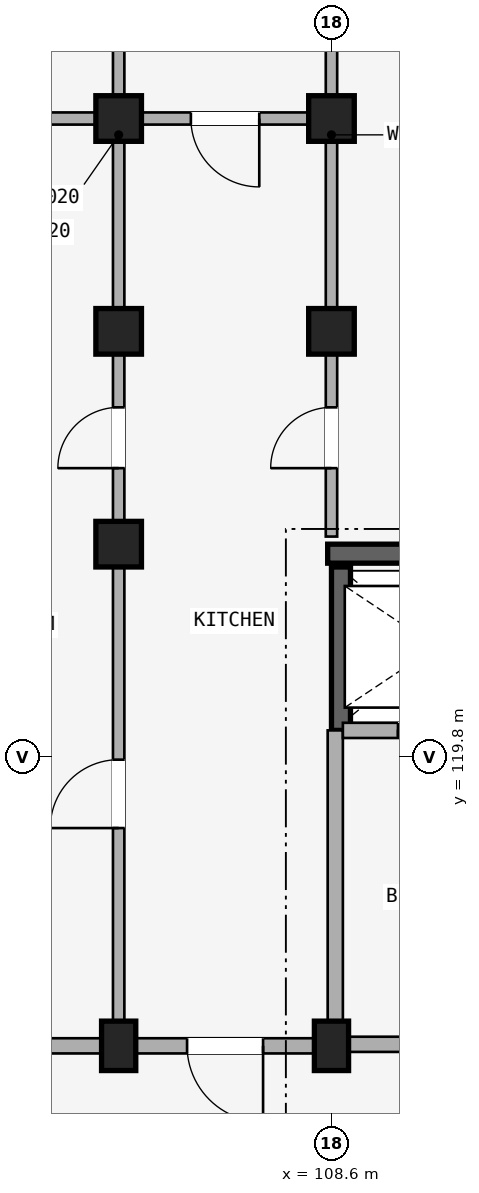
"""IFC4 building model, lengths in metres.
Left out: names, types, materials, properties, quantities, classifications, styles, units other than length and angle.
Written with IfcOpenShell. Run it as: python <this file> out.ifc"""

import sys

from ifc_helpers import new_model, si_unit, direction, frame, frame_2d, origin, origin_2d, place, context, subcontext, project, spatial, rectangle, extrude, element, fill, save


model = new_model("IFC4")
c1 = context("Model", 3, precision=1e-05, world=origin(), true_north=direction((0.0, 1.0)))
c2 = subcontext(c1, "Body", "Model", "MODEL_VIEW")
j1 = project(units=[si_unit("LENGTHUNIT", "METRE"), si_unit("PLANEANGLEUNIT", "RADIAN")], contexts=[c1])
p1 = place(None, origin())
s1 = spatial("IfcSite", under=j1, at=p1, CompositionType="ELEMENT")
p2 = place(p1, origin())
s2 = spatial("IfcBuilding", under=s1, at=p2, CompositionType="ELEMENT")
p3 = place(p2, frame((0.0, 0.0, 30.75)))
s3 = spatial("IfcBuildingStorey", under=s2, at=p3, CompositionType="ELEMENT", Elevation=30.75)
p4 = place(p3, frame((111.35, 122.475, 0.0), z_axis=(0.0, 0.0, 1.0), x_axis=(-1.0, 0.0, 0.0)))
e1 = element("IfcWall", 1, at=p4, inside=s3, PredefinedType="SHEAR", context=c2, shape_type="SweptSolid", body=[
    extrude(rectangle(XDim=2.8, YDim=0.25, at=frame_2d((1.4, 0.0))), origin(), (0.0, 0.0, 1.0), 2.93),
])
p5 = place(p3, frame((108.725, 120.15, 0.0), z_axis=(0.0, 0.0, 1.0), x_axis=(0.0, 1.0, 0.0)))
e2 = element("IfcWall", 2, at=p5, inside=s3, PredefinedType="SHEAR", context=c2, shape_type="SweptSolid", body=[
    extrude(rectangle(XDim=2.15, YDim=0.25, at=frame_2d((1.075, 0.0))), origin(), (0.0, 0.0, 1.0), 2.93),
])
p6 = place(p3, frame((108.6, 116.0, 0.0), z_axis=(0.0, 0.0, 1.0), x_axis=(1.0, 0.0, 0.0)))
e3 = element("IfcColumn", 3, at=p6, inside=s3, PredefinedType="COLUMN", context=c2, shape_type="SweptSolid", body=[
    extrude(rectangle(XDim=0.45, YDim=0.65, at=origin_2d()), origin(), (0.0, 0.0, 1.0), 2.93),
])
for number, where, z_axis, x_axis in (
    (4, (108.6, 125.4, 0.0), (0.0, 0.0, 1.0), (1.0, 0.0, 0.0)),
    (5, (108.6, 128.2, 0.0), (0.0, 0.0, 1.0), (1.0, 0.0, 0.0)),
):
    element("IfcColumn", number, at=place(p3, frame(where, z_axis=z_axis, x_axis=x_axis)), inside=s3, PredefinedType="COLUMN", context=c2, shape_type="SweptSolid", body=[
        extrude(rectangle(XDim=0.6, YDim=0.6, at=origin_2d()), origin(), (0.0, 0.0, 1.0), 2.93),
    ])
p7 = place(p3, frame((105.8, 116.0, 0.0), z_axis=(0.0, 0.0, 1.0), x_axis=(1.0, 0.0, 0.0)))
e6 = element("IfcColumn", 6, at=p7, inside=s3, PredefinedType="COLUMN", context=c2, shape_type="SweptSolid", body=[
    extrude(rectangle(XDim=0.45, YDim=0.65, at=origin_2d()), origin(), (0.0, 0.0, 1.0), 2.93),
])
for number, where, z_axis, x_axis in (
    (7, (105.8, 122.6, 0.0), (0.0, 0.0, 1.0), (1.0, 0.0, 0.0)),
    (8, (105.8, 125.4, 0.0), (0.0, 0.0, 1.0), (1.0, 0.0, 0.0)),
    (9, (105.8, 128.2, 0.0), (0.0, 0.0, 1.0), (1.0, 0.0, 0.0)),
):
    element("IfcColumn", number, at=place(p3, frame(where, z_axis=z_axis, x_axis=x_axis)), inside=s3, PredefinedType="COLUMN", context=c2, shape_type="SweptSolid", body=[
        extrude(rectangle(XDim=0.6, YDim=0.6, at=origin_2d()), origin(), (0.0, 0.0, 1.0), 2.93),
    ])
p8 = place(p3, frame((114.3, 116.02, 0.0), z_axis=(0.0, 0.0, 1.0), x_axis=(-1.0, 0.0, 0.0)))
e10 = element("IfcWall", 10, at=p8, inside=s3, PredefinedType="STANDARD", context=c2, shape_type="SweptSolid", body=[
    extrude(rectangle(XDim=5.65, YDim=0.2, at=frame_2d((2.825, 0.0))), origin(), (0.0, 0.0, 1.0), 2.372),
])
p9 = place(p8, frame((1.923, 0.0, 0.0)))
e11 = element("IfcOpeningElement", 11, at=p9, cuts=e10, PredefinedType="OPENING", context=c2, shape_type="SweptSolid", body=[
    extrude(rectangle(XDim=1.24, YDim=2.15, at=frame_2d((0.62, 1.075))), frame((0.0, 0.11, 0.0), z_axis=(0.0, -1.0, 0.0), x_axis=(1.0, 0.0, 0.0)), (0.0, 0.0, 1.0), 0.22),
])
p10 = place(p3, frame((108.65, 116.02, 0.0), z_axis=(0.0, 0.0, 1.0), x_axis=(0.0, 1.0, 0.0)))
e12 = element("IfcWall", 12, at=p10, inside=s3, PredefinedType="STANDARD", context=c2, shape_type="SweptSolid", body=[
    extrude(rectangle(XDim=4.13, YDim=0.2, at=frame_2d((2.065, 0.0))), origin(), (0.0, 0.0, 1.0), 2.372),
])
p11 = place(p3, frame((111.3, 120.15, 0.0), z_axis=(0.0, 0.0, 1.0), x_axis=(-1.0, 0.0, 0.0)))
e13 = element("IfcWall", 13, at=p11, inside=s3, PredefinedType="STANDARD", context=c2, shape_type="SweptSolid", body=[
    extrude(rectangle(XDim=2.55, YDim=0.2, at=frame_2d((1.275, 0.0))), origin(), (0.0, 0.0, 1.0), 2.372),
])
p12 = place(p11, frame((0.725, 0.0, 0.0)))
e14 = element("IfcOpeningElement", 14, at=p12, cuts=e13, PredefinedType="OPENING", context=c2, shape_type="SweptSolid", body=[
    extrude(rectangle(XDim=1.1, YDim=2.15, at=frame_2d((0.55, 1.075))), frame((0.0, 0.11, 0.0), z_axis=(0.0, -1.0, 0.0), x_axis=(1.0, 0.0, 0.0)), (0.0, 0.0, 1.0), 0.22),
])
p13 = place(p3, frame((108.6, 116.0, 0.0), z_axis=(0.0, 0.0, 1.0), x_axis=(-1.0, 0.0, 0.0)))
e15 = element("IfcWall", 15, at=p13, inside=s3, PredefinedType="STANDARD", context=c2, shape_type="SweptSolid", body=[
    extrude(rectangle(XDim=2.8, YDim=0.2, at=frame_2d((1.4, 0.0))), origin(), (0.0, 0.0, 1.0), 2.372),
])
p14 = place(p13, frame((0.9, 0.0, 0.0)))
e16 = element("IfcOpeningElement", 16, at=p14, cuts=e15, PredefinedType="OPENING", context=c2, shape_type="SweptSolid", body=[
    extrude(rectangle(XDim=1.0, YDim=2.15, at=frame_2d((0.5, 1.075))), frame((0.0, 0.11, 0.0), z_axis=(0.0, -1.0, 0.0), x_axis=(1.0, 0.0, 0.0)), (0.0, 0.0, 1.0), 0.22),
])
p15 = place(p3, frame((108.52, 128.2, 0.0), z_axis=(0.0, 0.0, 1.0), x_axis=(-1.0, 0.0, 0.0)))
e17 = element("IfcWall", 17, at=p15, inside=s3, PredefinedType="PLUMBINGWALL", context=c2, shape_type="SweptSolid", body=[
    extrude(rectangle(XDim=2.64, YDim=0.16, at=frame_2d((1.32, 0.0))), origin(), (0.0, 0.0, 1.0), 2.372),
])
p16 = place(p15, frame((0.87, 0.0, 0.0)))
e18 = element("IfcOpeningElement", 18, at=p16, cuts=e17, PredefinedType="OPENING", context=c2, shape_type="SweptSolid", body=[
    extrude(rectangle(XDim=0.9, YDim=2.1, at=frame_2d((0.45, 1.05))), frame((0.0, 0.09, 0.0), z_axis=(0.0, -1.0, 0.0), x_axis=(1.0, 0.0, 0.0)), (0.0, 0.0, 1.0), 0.18),
])
p17 = place(p3, frame((105.8, 116.0, 0.0), z_axis=(0.0, 0.0, 1.0), x_axis=(-1.0, 0.0, 0.0)))
e19 = element("IfcWall", 19, at=p17, inside=s3, PredefinedType="STANDARD", context=c2, shape_type="SweptSolid", body=[
    extrude(rectangle(XDim=2.8, YDim=0.2, at=frame_2d((1.4, 0.0))), origin(), (0.0, 0.0, 1.0), 2.372),
])
p18 = place(p3, frame((105.72, 128.2, 0.0), z_axis=(0.0, 0.0, 1.0), x_axis=(-1.0, 0.0, 0.0)))
e20 = element("IfcWall", 20, at=p18, inside=s3, PredefinedType="PLUMBINGWALL", context=c2, shape_type="SweptSolid", body=[
    extrude(rectangle(XDim=2.64, YDim=0.16, at=frame_2d((1.32, 0.0))), origin(), (0.0, 0.0, 1.0), 2.372),
])
p19 = place(p18, frame((0.92, 0.0, 0.0)))
e21 = element("IfcOpeningElement", 21, at=p19, cuts=e20, PredefinedType="OPENING", context=c2, shape_type="SweptSolid", body=[
    extrude(rectangle(XDim=0.8, YDim=2.1, at=frame_2d((0.4, 1.05))), frame((0.0, 0.09, 0.0), z_axis=(0.0, -1.0, 0.0), x_axis=(1.0, 0.0, 0.0)), (0.0, 0.0, 1.0), 0.18),
])
p20 = place(p3, frame((108.6, 122.7, 0.0), z_axis=(0.0, 0.0, 1.0), x_axis=(0.0, 1.0, 0.0)))
e22 = element("IfcWall", 22, at=p20, inside=s3, PredefinedType="PARTITIONING", context=c2, shape_type="SweptSolid", body=[
    extrude(rectangle(XDim=8.02, YDim=0.15, at=frame_2d((4.01, 0.0))), origin(), (0.0, 0.0, 1.0), 2.372),
])
p21 = place(p20, frame((0.9, 0.0, 0.0)))
e23 = element("IfcOpeningElement", 23, at=p21, cuts=e22, PredefinedType="OPENING", context=c2, shape_type="SweptSolid", body=[
    extrude(rectangle(XDim=0.8, YDim=2.1, at=frame_2d((0.4, 1.05))), frame((0.0, 0.085, 0.0), z_axis=(0.0, -1.0, 0.0), x_axis=(1.0, 0.0, 0.0)), (0.0, 0.0, 1.0), 0.17),
])
p22 = place(p3, frame((105.8, 116.05, 0.0), z_axis=(0.0, 0.0, 1.0), x_axis=(0.0, 1.0, 0.0)))
e24 = element("IfcWall", 24, at=p22, inside=s3, PredefinedType="PARTITIONING", context=c2, shape_type="SweptSolid", body=[
    extrude(rectangle(XDim=6.53, YDim=0.15, at=frame_2d((3.265, 0.0))), origin(), (0.0, 0.0, 1.0), 2.372),
])
p23 = place(p22, frame((2.815, 0.0, 0.0)))
e25 = element("IfcOpeningElement", 25, at=p23, cuts=e24, PredefinedType="OPENING", context=c2, shape_type="SweptSolid", body=[
    extrude(rectangle(XDim=0.9, YDim=2.1, at=frame_2d((0.45, 1.05))), frame((0.0, 0.085, 0.0), z_axis=(0.0, -1.0, 0.0), x_axis=(1.0, 0.0, 0.0)), (0.0, 0.0, 1.0), 0.17),
])
p24 = place(p3, frame((105.8, 122.7, 0.0), z_axis=(0.0, 0.0, 1.0), x_axis=(0.0, 1.0, 0.0)))
e26 = element("IfcWall", 26, at=p24, inside=s3, PredefinedType="PARTITIONING", context=c2, shape_type="SweptSolid", body=[
    extrude(rectangle(XDim=8.02, YDim=0.15, at=frame_2d((4.01, 0.0))), origin(), (0.0, 0.0, 1.0), 2.372),
])
p25 = place(p24, frame((0.9, 0.0, 0.0)))
e27 = element("IfcOpeningElement", 27, at=p25, cuts=e26, PredefinedType="OPENING", context=c2, shape_type="SweptSolid", body=[
    extrude(rectangle(XDim=0.8, YDim=2.1, at=frame_2d((0.4, 1.05))), frame((0.0, 0.085, 0.0), z_axis=(0.0, -1.0, 0.0), x_axis=(1.0, 0.0, 0.0)), (0.0, 0.0, 1.0), 0.17),
])
p26 = place(p12, origin())
e28 = element("IfcDoor", 28, at=p26, inside=s3, OperationType="SLIDING_TO_LEFT", PredefinedType="DOOR", context=c2, shape_type="SweptSolid", body=[
    extrude(rectangle(XDim=1.1, YDim=2.15, at=frame_2d((0.55, 1.075))), frame((0.0, 0.025, 0.0), z_axis=(0.0, -1.0, 0.0), x_axis=(1.0, 0.0, 0.0)), (0.0, 0.0, 1.0), 0.05),
])
fill(e14, e28)
p27 = place(p16, frame((0.9, 0.0, 0.0), z_axis=(0.0, 0.0, 1.0), x_axis=(-1.0, 0.0, 0.0)))
e29 = element("IfcDoor", 29, at=p27, inside=s3, OperationType="SINGLE_SWING_RIGHT", PredefinedType="DOOR", context=c2, shape_type="SweptSolid", body=[
    extrude(rectangle(XDim=0.9, YDim=2.1, at=frame_2d((0.45, 1.05))), frame((0.0, 0.025, 0.0), z_axis=(0.0, -1.0, 0.0), x_axis=(1.0, 0.0, 0.0)), (0.0, 0.0, 1.0), 0.05),
])
fill(e18, e29)
p28 = place(p14, origin())
e30 = element("IfcDoor", 30, at=p28, inside=s3, OperationType="SINGLE_SWING_LEFT", PredefinedType="DOOR", context=c2, shape_type="SweptSolid", body=[
    extrude(rectangle(XDim=1.0, YDim=2.15, at=frame_2d((0.5, 1.075))), frame((0.0, 0.025, 0.0), z_axis=(0.0, -1.0, 0.0), x_axis=(1.0, 0.0, 0.0)), (0.0, 0.0, 1.0), 0.05),
])
fill(e16, e30)
p29 = place(p21, origin())
e31 = element("IfcDoor", 31, at=p29, inside=s3, OperationType="SINGLE_SWING_LEFT", PredefinedType="DOOR", context=c2, shape_type="SweptSolid", body=[
    extrude(rectangle(XDim=0.8, YDim=2.1, at=frame_2d((0.4, 1.05))), frame((0.0, 0.025, 0.0), z_axis=(0.0, -1.0, 0.0), x_axis=(1.0, 0.0, 0.0)), (0.0, 0.0, 1.0), 0.05),
])
fill(e23, e31)
p30 = place(p23, origin())
e32 = element("IfcDoor", 32, at=p30, inside=s3, OperationType="SINGLE_SWING_LEFT", PredefinedType="DOOR", context=c2, shape_type="SweptSolid", body=[
    extrude(rectangle(XDim=0.9, YDim=2.1, at=frame_2d((0.45, 1.05))), frame((0.0, 0.025, 0.0), z_axis=(0.0, -1.0, 0.0), x_axis=(1.0, 0.0, 0.0)), (0.0, 0.0, 1.0), 0.05),
])
fill(e25, e32)
p31 = place(p25, frame((0.8, 0.0, 0.0), z_axis=(0.0, 0.0, 1.0), x_axis=(-1.0, 0.0, 0.0)))
e33 = element("IfcDoor", 33, at=p31, inside=s3, OperationType="SINGLE_SWING_RIGHT", PredefinedType="DOOR", context=c2, shape_type="SweptSolid", body=[
    extrude(rectangle(XDim=0.8, YDim=2.1, at=frame_2d((0.4, 1.05))), frame((0.0, 0.025, 0.0), z_axis=(0.0, -1.0, 0.0), x_axis=(1.0, 0.0, 0.0)), (0.0, 0.0, 1.0), 0.05),
])
fill(e27, e33)
save(model, sys.argv[1])
